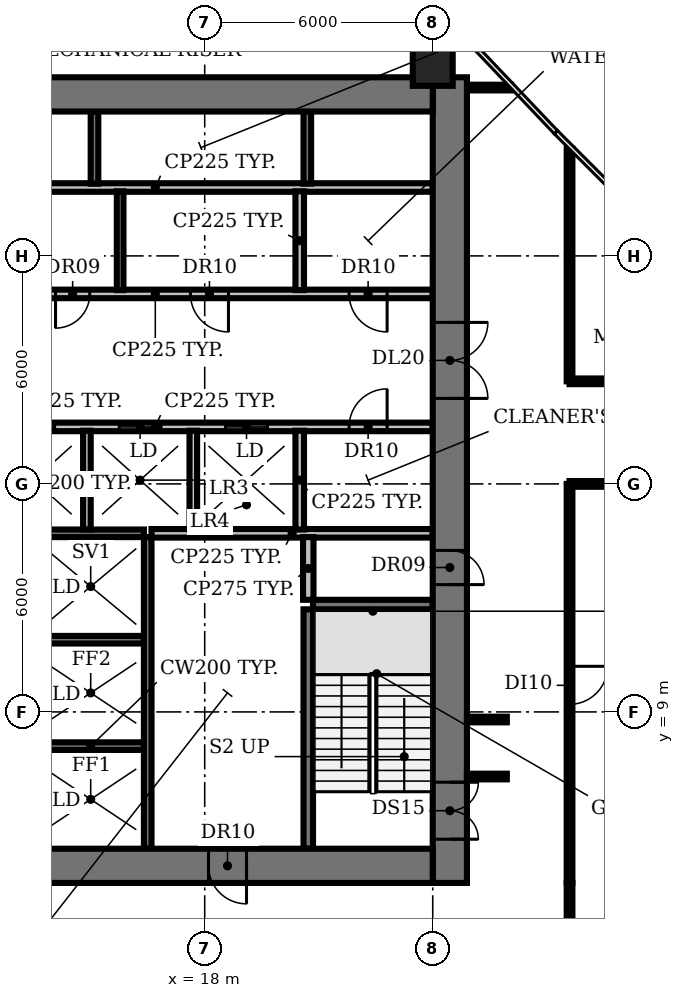
"""IFC4 building model, lengths in metres.
Left out: names, types, materials, properties, quantities, classifications, styles, units other than length and angle.
Written with IfcOpenShell. Run it as: python <this file> out.ifc"""

import sys

from ifc_helpers import new_model, si_unit, direction, frame, frame_2d, origin, origin_2d, place, context, subcontext, project, spatial, rectangle, circle, extrude, element, fill, save


model = new_model("IFC4")
c1 = context("Model", 3, precision=1e-05, world=origin(), true_north=direction((0.0, 1.0)))
c2 = subcontext(c1, "Body", "Model", "MODEL_VIEW")
j1 = project(units=[si_unit("LENGTHUNIT", "METRE"), si_unit("PLANEANGLEUNIT", "RADIAN")], contexts=[c1])
p1 = place(None, origin())
s1 = spatial("IfcSite", under=j1, at=p1, CompositionType="ELEMENT")
p2 = place(p1, origin())
s2 = spatial("IfcBuilding", under=s1, at=p2, CompositionType="ELEMENT")
p3 = place(p2, frame((0.0, 0.0, 45.8)))
s3 = spatial("IfcBuildingStorey", under=s2, at=p3, CompositionType="ELEMENT", Elevation=45.8)
p4 = place(p3, frame((24.0, 26.0, 0.0), z_axis=(0.0, 0.0, 1.0), x_axis=(1.0, 0.0, 0.0)))
e1 = element("IfcColumn", 1, at=p4, inside=s3, PredefinedType="COLUMN", context=c2, shape_type="SweptSolid", body=[
    extrude(circle(Radius=0.525, at=origin_2d()), origin(), (0.0, 0.0, 1.0), 3.85),
])
for number, where, z_axis, x_axis in (
    (2, (13.6, 8.1, 0.0), (0.0, 0.0, 1.0), (1.0, 0.0, 0.0)),
    (3, (13.6, 10.9, 0.0), (0.0, 0.0, 1.0), (1.0, 0.0, 0.0)),
):
    element("IfcWall", number, at=place(p3, frame(where, z_axis=z_axis, x_axis=x_axis)), inside=s3, PredefinedType="SHEAR", context=c2, shape_type="SweptSolid", body=[
        extrude(rectangle(XDim=2.8, YDim=0.2, at=frame_2d((1.4, 0.0))), origin(), (0.0, 0.0, 1.0), 3.85),
    ])
p5 = place(p3, frame((20.85, 11.825, 0.0), z_axis=(0.0, 0.0, 1.0), x_axis=(1.0, 0.0, 0.0)))
e4 = element("IfcWall", 4, at=p5, inside=s3, PredefinedType="SHEAR", context=c2, shape_type="SweptSolid", body=[
    extrude(rectangle(XDim=3.15, YDim=0.25, at=frame_2d((1.575, 0.0))), origin(), (0.0, 0.0, 1.0), 3.85),
])
p6 = place(p3, frame((13.6, 13.7, 0.0), z_axis=(0.0, 0.0, 1.0), x_axis=(1.0, 0.0, 0.0)))
e5 = element("IfcWall", 5, at=p6, inside=s3, PredefinedType="SHEAR", context=c2, shape_type="SweptSolid", body=[
    extrude(rectangle(XDim=2.8, YDim=0.2, at=frame_2d((1.4, 0.0))), origin(), (0.0, 0.0, 1.0), 3.85),
])
p7 = place(p3, frame((16.6, 13.7, 0.0), z_axis=(0.0, 0.0, 1.0), x_axis=(1.0, 0.0, 0.0)))
e6 = element("IfcWall", 6, at=p7, inside=s3, PredefinedType="PARTITIONING", context=c2, shape_type="SweptSolid", body=[
    extrude(rectangle(XDim=7.4, YDim=0.225, at=frame_2d((3.7, 0.0))), origin(), (0.0, 0.0, 1.0), 3.85),
])
p8 = place(p3, frame((9.4, 16.5, 0.0), z_axis=(0.0, 0.0, 1.0), x_axis=(1.0, 0.0, 0.0)))
e7 = element("IfcWall", 7, at=p8, inside=s3, PredefinedType="PARTITIONING", context=c2, shape_type="SweptSolid", body=[
    extrude(rectangle(XDim=14.6, YDim=0.225, at=frame_2d((7.3, 0.0))), origin(), (0.0, 0.0, 1.0), 3.85),
])
p9 = place(p8, frame((0.75, 0.0, 0.0)))
e8 = element("IfcOpeningElement", 8, at=p9, cuts=e7, PredefinedType="OPENING", context=c2, shape_type="SweptSolid", body=[
    extrude(rectangle(XDim=1.1, YDim=2.1, at=frame_2d((0.55, 1.05))), frame((0.0, 0.123, 0.0), z_axis=(0.0, -1.0, 0.0), x_axis=(1.0, 0.0, 0.0)), (0.0, 0.0, 1.0), 0.245),
])
p10 = place(p8, frame((3.55, 0.0, 0.0)))
e9 = element("IfcOpeningElement", 9, at=p10, cuts=e7, PredefinedType="OPENING", context=c2, shape_type="SweptSolid", body=[
    extrude(rectangle(XDim=1.1, YDim=2.1, at=frame_2d((0.55, 1.05))), frame((0.0, 0.123, 0.0), z_axis=(0.0, -1.0, 0.0), x_axis=(1.0, 0.0, 0.0)), (0.0, 0.0, 1.0), 0.245),
])
p11 = place(p8, frame((6.35, 0.0, 0.0)))
e10 = element("IfcOpeningElement", 10, at=p11, cuts=e7, PredefinedType="OPENING", context=c2, shape_type="SweptSolid", body=[
    extrude(rectangle(XDim=1.1, YDim=2.1, at=frame_2d((0.55, 1.05))), frame((0.0, 0.123, 0.0), z_axis=(0.0, -1.0, 0.0), x_axis=(1.0, 0.0, 0.0)), (0.0, 0.0, 1.0), 0.245),
])
p12 = place(p8, frame((9.15, 0.0, 0.0)))
e11 = element("IfcOpeningElement", 11, at=p12, cuts=e7, PredefinedType="OPENING", context=c2, shape_type="SweptSolid", body=[
    extrude(rectangle(XDim=1.1, YDim=2.1, at=frame_2d((0.55, 1.05))), frame((0.0, 0.123, 0.0), z_axis=(0.0, -1.0, 0.0), x_axis=(1.0, 0.0, 0.0)), (0.0, 0.0, 1.0), 0.245),
])
p13 = place(p8, frame((12.4, 0.0, 0.0)))
e12 = element("IfcOpeningElement", 12, at=p13, cuts=e7, PredefinedType="OPENING", context=c2, shape_type="SweptSolid", body=[
    extrude(rectangle(XDim=1.0, YDim=2.1, at=frame_2d((0.5, 1.05))), frame((0.0, 0.123, 0.0), z_axis=(0.0, -1.0, 0.0), x_axis=(1.0, 0.0, 0.0)), (0.0, 0.0, 1.0), 0.245),
])
p14 = place(p3, frame((24.0, 20.0, 0.0), z_axis=(0.0, 0.0, 1.0), x_axis=(-1.0, 0.0, 0.0)))
e13 = element("IfcWall", 13, at=p14, inside=s3, PredefinedType="PARTITIONING", context=c2, shape_type="SweptSolid", body=[
    extrude(rectangle(XDim=14.6, YDim=0.225, at=frame_2d((7.3, 0.0))), origin(), (0.0, 0.0, 1.0), 3.85),
])
p15 = place(p14, frame((12.2, 0.0, 0.0)))
e14 = element("IfcOpeningElement", 14, at=p15, cuts=e13, PredefinedType="OPENING", context=c2, shape_type="SweptSolid", body=[
    extrude(rectangle(XDim=1.0, YDim=2.1, at=frame_2d((0.5, 1.05))), frame((0.0, 0.123, 0.0), z_axis=(0.0, -1.0, 0.0), x_axis=(1.0, 0.0, 0.0)), (0.0, 0.0, 1.0), 0.245),
])
p16 = place(p14, frame((9.025, 0.0, 0.0)))
e15 = element("IfcOpeningElement", 15, at=p16, cuts=e13, PredefinedType="OPENING", context=c2, shape_type="SweptSolid", body=[
    extrude(rectangle(XDim=0.9, YDim=2.1, at=frame_2d((0.45, 1.05))), frame((0.0, 0.123, 0.0), z_axis=(0.0, -1.0, 0.0), x_axis=(1.0, 0.0, 0.0)), (0.0, 0.0, 1.0), 0.245),
])
p17 = place(p14, frame((5.375, 0.0, 0.0)))
e16 = element("IfcOpeningElement", 16, at=p17, cuts=e13, PredefinedType="OPENING", context=c2, shape_type="SweptSolid", body=[
    extrude(rectangle(XDim=1.0, YDim=2.1, at=frame_2d((0.5, 1.05))), frame((0.0, 0.123, 0.0), z_axis=(0.0, -1.0, 0.0), x_axis=(1.0, 0.0, 0.0)), (0.0, 0.0, 1.0), 0.245),
])
p18 = place(p14, frame((1.2, 0.0, 0.0)))
e17 = element("IfcOpeningElement", 17, at=p18, cuts=e13, PredefinedType="OPENING", context=c2, shape_type="SweptSolid", body=[
    extrude(rectangle(XDim=1.0, YDim=2.1, at=frame_2d((0.5, 1.05))), frame((0.0, 0.123, 0.0), z_axis=(0.0, -1.0, 0.0), x_axis=(1.0, 0.0, 0.0)), (0.0, 0.0, 1.0), 0.245),
])
p19 = place(p3, frame((9.4, 22.8, 0.0), z_axis=(0.0, 0.0, 1.0), x_axis=(1.0, 0.0, 0.0)))
e18 = element("IfcWall", 18, at=p19, inside=s3, PredefinedType="PARTITIONING", context=c2, shape_type="SweptSolid", body=[
    extrude(rectangle(XDim=14.6, YDim=0.225, at=frame_2d((7.3, 0.0))), origin(), (0.0, 0.0, 1.0), 3.85),
])
p20 = place(p3, frame((14.9, 13.8, 0.0), z_axis=(0.0, 0.0, 1.0), x_axis=(0.0, 1.0, 0.0)))
e19 = element("IfcWall", 19, at=p20, inside=s3, PredefinedType="SOLIDWALL", context=c2, shape_type="SweptSolid", body=[
    extrude(rectangle(XDim=2.6, YDim=0.2, at=frame_2d((1.3, 0.0))), origin(), (0.0, 0.0, 1.0), 3.85),
])
p21 = place(p3, frame((15.1, 22.9, 0.0), z_axis=(0.0, 0.0, 1.0), x_axis=(0.0, 1.0, 0.0)))
e20 = element("IfcWall", 20, at=p21, inside=s3, PredefinedType="SHEAR", context=c2, shape_type="SweptSolid", body=[
    extrude(rectangle(XDim=1.9, YDim=0.2, at=frame_2d((0.95, 0.0))), origin(), (0.0, 0.0, 1.0), 3.85),
])
p22 = place(p3, frame((15.775, 20.1, 0.0), z_axis=(0.0, 0.0, 1.0), x_axis=(0.0, 1.0, 0.0)))
e21 = element("IfcWall", 21, at=p22, inside=s3, PredefinedType="PARTITIONING", context=c2, shape_type="SweptSolid", body=[
    extrude(rectangle(XDim=2.6, YDim=0.175, at=frame_2d((1.3, 0.0))), origin(), (0.0, 0.0, 1.0), 3.85),
])
p23 = place(p3, frame((16.5, 5.4, 0.0), z_axis=(0.0, 0.0, 1.0), x_axis=(0.0, 1.0, 0.0)))
e22 = element("IfcWall", 22, at=p23, inside=s3, PredefinedType="SHEAR", context=c2, shape_type="SweptSolid", body=[
    extrude(rectangle(XDim=8.2, YDim=0.2, at=frame_2d((4.1, 0.0))), origin(), (0.0, 0.0, 1.0), 3.85),
])
p24 = place(p3, frame((17.7, 13.8, 0.0), z_axis=(0.0, 0.0, 1.0), x_axis=(0.0, 1.0, 0.0)))
e23 = element("IfcWall", 23, at=p24, inside=s3, PredefinedType="SOLIDWALL", context=c2, shape_type="SweptSolid", body=[
    extrude(rectangle(XDim=2.6, YDim=0.2, at=frame_2d((1.3, 0.0))), origin(), (0.0, 0.0, 1.0), 3.85),
])
for number, where, z_axis, x_axis in (
    (24, (20.5, 13.8, 0.0), (0.0, 0.0, 1.0), (0.0, 1.0, 0.0)),
    (25, (20.5, 20.1, 0.0), (0.0, 0.0, 1.0), (0.0, 1.0, 0.0)),
):
    element("IfcWall", number, at=place(p3, frame(where, z_axis=z_axis, x_axis=x_axis)), inside=s3, PredefinedType="PARTITIONING", context=c2, shape_type="SweptSolid", body=[
        extrude(rectangle(XDim=2.6, YDim=0.225, at=frame_2d((1.3, 0.0))), origin(), (0.0, 0.0, 1.0), 3.85),
    ])
p25 = place(p3, frame((20.7, 22.9, 0.0), z_axis=(0.0, 0.0, 1.0), x_axis=(0.0, 1.0, 0.0)))
e26 = element("IfcWall", 26, at=p25, inside=s3, PredefinedType="SHEAR", context=c2, shape_type="SweptSolid", body=[
    extrude(rectangle(XDim=1.9, YDim=0.2, at=frame_2d((0.95, 0.0))), origin(), (0.0, 0.0, 1.0), 3.85),
])
p26 = place(p3, frame((20.725, 5.4, 0.0), z_axis=(0.0, 0.0, 1.0), x_axis=(0.0, 1.0, 0.0)))
e27 = element("IfcWall", 27, at=p26, inside=s3, PredefinedType="SHEAR", context=c2, shape_type="SweptSolid", body=[
    extrude(rectangle(XDim=6.3, YDim=0.25, at=frame_2d((3.15, 0.0))), origin(), (0.0, 0.0, 1.0), 3.85),
])
p27 = place(p3, frame((20.725, 11.95, 0.0), z_axis=(0.0, 0.0, 1.0), x_axis=(0.0, 1.0, 0.0)))
e28 = element("IfcWall", 28, at=p27, inside=s3, PredefinedType="PARTITIONING", context=c2, shape_type="SweptSolid", body=[
    extrude(rectangle(XDim=1.65, YDim=0.275, at=frame_2d((0.825, 0.0))), origin(), (0.0, 0.0, 1.0), 3.85),
])
p28 = place(p3, frame((24.45, 25.7, 0.0), z_axis=(0.0, 0.0, 1.0), x_axis=(0.0, -1.0, 0.0)))
e29 = element("IfcWall", 29, at=p28, inside=s3, PredefinedType="SHEAR", context=c2, shape_type="SweptSolid", body=[
    extrude(rectangle(XDim=21.2, YDim=0.9, at=frame_2d((10.6, 0.0))), origin(), (0.0, 0.0, 1.0), 3.85),
])
p29 = place(p28, frame((18.55, 0.0, 0.0)))
e30 = element("IfcOpeningElement", 30, at=p29, cuts=e29, PredefinedType="OPENING", context=c2, shape_type="SweptSolid", body=[
    extrude(rectangle(XDim=1.5, YDim=2.1, at=frame_2d((0.75, 1.05))), frame((0.0, 0.46, 0.0), z_axis=(0.0, -1.0, 0.0), x_axis=(1.0, 0.0, 0.0)), (0.0, 0.0, 1.0), 0.92),
])
p30 = place(p28, frame((12.45, 0.0, 0.0)))
e31 = element("IfcOpeningElement", 31, at=p30, cuts=e29, PredefinedType="OPENING", context=c2, shape_type="SweptSolid", body=[
    extrude(rectangle(XDim=0.9, YDim=2.1, at=frame_2d((0.45, 1.05))), frame((0.0, 0.46, 0.0), z_axis=(0.0, -1.0, 0.0), x_axis=(1.0, 0.0, 0.0)), (0.0, 0.0, 1.0), 0.92),
])
p31 = place(p28, frame((6.45, 0.0, 0.0)))
e32 = element("IfcOpeningElement", 32, at=p31, cuts=e29, PredefinedType="OPENING", context=c2, shape_type="SweptSolid", body=[
    extrude(rectangle(XDim=2.0, YDim=2.1, at=frame_2d((1.0, 1.05))), frame((0.0, 0.46, 0.0), z_axis=(0.0, -1.0, 0.0), x_axis=(1.0, 0.0, 0.0)), (0.0, 0.0, 1.0), 0.92),
])
p32 = place(p3, frame((24.0, 4.95, 0.0), z_axis=(0.0, 0.0, 1.0), x_axis=(-1.0, 0.0, 0.0)))
e33 = element("IfcWall", 33, at=p32, inside=s3, PredefinedType="SHEAR", context=c2, shape_type="SweptSolid", body=[
    extrude(rectangle(XDim=18.0, YDim=0.9, at=frame_2d((9.0, 0.0))), origin(), (0.0, 0.0, 1.0), 3.85),
])
p33 = place(p32, frame((13.0, 0.0, 0.0)))
e34 = element("IfcOpeningElement", 34, at=p33, cuts=e33, PredefinedType="OPENING", context=c2, shape_type="SweptSolid", body=[
    extrude(rectangle(XDim=1.2, YDim=2.1, at=frame_2d((0.6, 1.05))), frame((0.0, 0.46, 0.0), z_axis=(0.0, -1.0, 0.0), x_axis=(1.0, 0.0, 0.0)), (0.0, 0.0, 1.0), 0.92),
])
p34 = place(p32, frame((4.9, 0.0, 0.0)))
e35 = element("IfcOpeningElement", 35, at=p34, cuts=e33, PredefinedType="OPENING", context=c2, shape_type="SweptSolid", body=[
    extrude(rectangle(XDim=1.0, YDim=2.1, at=frame_2d((0.5, 1.05))), frame((0.0, 0.46, 0.0), z_axis=(0.0, -1.0, 0.0), x_axis=(1.0, 0.0, 0.0)), (0.0, 0.0, 1.0), 0.92),
])
p35 = place(p3, frame((6.0, 25.25, 0.0), z_axis=(0.0, 0.0, 1.0), x_axis=(1.0, 0.0, 0.0)))
e36 = element("IfcWall", 36, at=p35, inside=s3, PredefinedType="SHEAR", context=c2, shape_type="SweptSolid", body=[
    extrude(rectangle(XDim=18.0, YDim=0.9, at=frame_2d((9.0, 0.0))), origin(), (0.0, 0.0, 1.0), 3.85),
])
for number, where, z_axis, x_axis in (
    (37, (24.9, 7.3, 0.0), (0.0, 0.0, 1.0), (1.0, 0.0, 0.0)),
    (38, (24.9, 8.8, 0.0), (0.0, 0.0, 1.0), (1.0, 0.0, 0.0)),
):
    element("IfcWall", number, at=place(p3, frame(where, z_axis=z_axis, x_axis=x_axis)), inside=s3, PredefinedType="PARTITIONING", context=c2, shape_type="SweptSolid", body=[
        extrude(rectangle(XDim=1.05, YDim=0.15, at=frame_2d((0.525, 0.0))), origin(), (0.0, 0.0, 1.0), 2.83),
    ])
p36 = place(p3, frame((25.0, 25.43, 0.0), z_axis=(0.0, 0.0, 1.0), x_axis=(1.0, 0.0, 0.0)))
e39 = element("IfcWall", 39, at=p36, inside=s3, PredefinedType="PARTITIONING", context=c2, shape_type="SweptSolid", body=[
    extrude(rectangle(XDim=1.06, YDim=0.15, at=frame_2d((0.53, 0.0))), origin(), (0.0, 0.0, 1.0), 2.83),
])
p37 = place(p3, frame((27.6, 0.6, 0.0), z_axis=(0.0, 0.0, 1.0), x_axis=(0.0, 1.0, 0.0)))
e40 = element("IfcWall", 40, at=p37, inside=s3, PredefinedType="PARTITIONING", context=c2, shape_type="SweptSolid", body=[
    extrude(rectangle(XDim=3.9, YDim=0.15, at=frame_2d((1.95, 0.0))), origin(), (0.0, 0.0, 1.0), 2.83),
])
p38 = place(p3, frame((27.6, 15.0, 0.0), z_axis=(0.0, 0.0, 1.0), x_axis=(0.0, -1.0, 0.0)))
e41 = element("IfcWall", 41, at=p38, inside=s3, PredefinedType="PARTITIONING", context=c2, shape_type="SweptSolid", body=[
    extrude(rectangle(XDim=10.5, YDim=0.15, at=frame_2d((5.25, 0.0))), origin(), (0.0, 0.0, 1.0), 2.83),
])
p39 = place(p38, frame((4.8, 0.0, 0.0)))
e42 = element("IfcOpeningElement", 42, at=p39, cuts=e41, PredefinedType="OPENING", context=c2, shape_type="SweptSolid", body=[
    extrude(rectangle(XDim=1.0, YDim=2.1, at=frame_2d((0.5, 1.05))), frame((0.0, 0.085, 0.0), z_axis=(0.0, -1.0, 0.0), x_axis=(1.0, 0.0, 0.0)), (0.0, 0.0, 1.0), 0.17),
])
p40 = place(p3, frame((27.6, 15.0, 0.0), z_axis=(0.0, 0.0, 1.0), x_axis=(1.0, 0.0, 0.0)))
e43 = element("IfcWall", 43, at=p40, inside=s3, PredefinedType="PARTITIONING", context=c2, shape_type="SweptSolid", body=[
    extrude(rectangle(XDim=8.4, YDim=0.15, at=frame_2d((4.2, 0.0))), origin(), (0.0, 0.0, 1.0), 2.83),
])
p41 = place(p3, frame((27.6, 17.7, 0.0), z_axis=(0.0, 0.0, 1.0), x_axis=(0.0, 1.0, 0.0)))
e44 = element("IfcWall", 44, at=p41, inside=s3, PredefinedType="PARTITIONING", context=c2, shape_type="SweptSolid", body=[
    extrude(rectangle(XDim=6.12, YDim=0.15, at=frame_2d((3.06, 0.0))), origin(), (0.0, 0.0, 1.0), 2.83),
])
p42 = place(p3, frame((27.6, 17.7, 0.0), z_axis=(0.0, 0.0, 1.0), x_axis=(1.0, 0.0, 0.0)))
e45 = element("IfcWall", 45, at=p42, inside=s3, PredefinedType="PARTITIONING", context=c2, shape_type="SweptSolid", body=[
    extrude(rectangle(XDim=8.4, YDim=0.15, at=frame_2d((4.2, 0.0))), origin(), (0.0, 0.0, 1.0), 2.83),
])
p43 = place(p42, frame((3.9, 0.0, 0.0)))
e46 = element("IfcOpeningElement", 46, at=p43, cuts=e45, PredefinedType="OPENING", context=c2, shape_type="SweptSolid", body=[
    extrude(rectangle(XDim=1.0, YDim=2.1, at=frame_2d((0.5, 1.05))), frame((0.0, 0.085, 0.0), z_axis=(0.0, -1.0, 0.0), x_axis=(1.0, 0.0, 0.0)), (0.0, 0.0, 1.0), 0.17),
])
p44 = place(p10, origin())
e47 = element("IfcDoor", 47, at=p44, inside=s3, OperationType="DOUBLE_DOOR_SLIDING", PredefinedType="DOOR", context=c2, shape_type="SweptSolid", body=[
    extrude(rectangle(XDim=1.1, YDim=2.1, at=frame_2d((0.55, 1.05))), frame((0.0, 0.025, 0.0), z_axis=(0.0, -1.0, 0.0), x_axis=(1.0, 0.0, 0.0)), (0.0, 0.0, 1.0), 0.05),
])
fill(e9, e47)
p45 = place(p11, origin())
e48 = element("IfcDoor", 48, at=p45, inside=s3, OperationType="DOUBLE_DOOR_SLIDING", PredefinedType="DOOR", context=c2, shape_type="SweptSolid", body=[
    extrude(rectangle(XDim=1.1, YDim=2.1, at=frame_2d((0.55, 1.05))), frame((0.0, 0.025, 0.0), z_axis=(0.0, -1.0, 0.0), x_axis=(1.0, 0.0, 0.0)), (0.0, 0.0, 1.0), 0.05),
])
fill(e10, e48)
p46 = place(p12, origin())
e49 = element("IfcDoor", 49, at=p46, inside=s3, OperationType="DOUBLE_DOOR_SLIDING", PredefinedType="DOOR", context=c2, shape_type="SweptSolid", body=[
    extrude(rectangle(XDim=1.1, YDim=2.1, at=frame_2d((0.55, 1.05))), frame((0.0, 0.025, 0.0), z_axis=(0.0, -1.0, 0.0), x_axis=(1.0, 0.0, 0.0)), (0.0, 0.0, 1.0), 0.05),
])
fill(e11, e49)
p47 = place(p13, origin())
e50 = element("IfcDoor", 50, at=p47, inside=s3, OperationType="SINGLE_SWING_RIGHT", PredefinedType="DOOR", context=c2, shape_type="SweptSolid", body=[
    extrude(rectangle(XDim=1.0, YDim=2.1, at=frame_2d((0.5, 1.05))), frame((0.0, 0.025, 0.0), z_axis=(0.0, -1.0, 0.0), x_axis=(1.0, 0.0, 0.0)), (0.0, 0.0, 1.0), 0.05),
])
fill(e12, e50)
p48 = place(p16, origin())
e51 = element("IfcDoor", 51, at=p48, inside=s3, OperationType="SINGLE_SWING_RIGHT", PredefinedType="DOOR", context=c2, shape_type="SweptSolid", body=[
    extrude(rectangle(XDim=0.9, YDim=2.1, at=frame_2d((0.45, 1.05))), frame((0.0, 0.025, 0.0), z_axis=(0.0, -1.0, 0.0), x_axis=(1.0, 0.0, 0.0)), (0.0, 0.0, 1.0), 0.05),
])
fill(e15, e51)
p49 = place(p17, origin())
e52 = element("IfcDoor", 52, at=p49, inside=s3, OperationType="SINGLE_SWING_LEFT", PredefinedType="DOOR", context=c2, shape_type="SweptSolid", body=[
    extrude(rectangle(XDim=1.0, YDim=2.1, at=frame_2d((0.5, 1.05))), frame((0.0, 0.025, 0.0), z_axis=(0.0, -1.0, 0.0), x_axis=(1.0, 0.0, 0.0)), (0.0, 0.0, 1.0), 0.05),
])
fill(e16, e52)
p50 = place(p18, origin())
e53 = element("IfcDoor", 53, at=p50, inside=s3, OperationType="SINGLE_SWING_LEFT", PredefinedType="DOOR", context=c2, shape_type="SweptSolid", body=[
    extrude(rectangle(XDim=1.0, YDim=2.1, at=frame_2d((0.5, 1.05))), frame((0.0, 0.025, 0.0), z_axis=(0.0, -1.0, 0.0), x_axis=(1.0, 0.0, 0.0)), (0.0, 0.0, 1.0), 0.05),
])
fill(e17, e53)
p51 = place(p29, origin())
e54 = element("IfcDoor", 54, at=p51, inside=s3, OperationType="DOUBLE_DOOR_SINGLE_SWING", PredefinedType="DOOR", context=c2, shape_type="SweptSolid", body=[
    extrude(rectangle(XDim=1.5, YDim=2.1, at=frame_2d((0.75, 1.05))), frame((0.0, 0.025, 0.0), z_axis=(0.0, -1.0, 0.0), x_axis=(1.0, 0.0, 0.0)), (0.0, 0.0, 1.0), 0.05),
])
fill(e30, e54)
p52 = place(p30, origin())
e55 = element("IfcDoor", 55, at=p52, inside=s3, OperationType="SINGLE_SWING_RIGHT", PredefinedType="DOOR", context=c2, shape_type="SweptSolid", body=[
    extrude(rectangle(XDim=0.9, YDim=2.1, at=frame_2d((0.45, 1.05))), frame((0.0, -0.39, 0.0), z_axis=(0.0, -1.0, 0.0), x_axis=(1.0, 0.0, 0.0)), (0.0, 0.0, 1.0), 0.05),
])
fill(e31, e55)
p53 = place(p31, origin())
e56 = element("IfcDoor", 56, at=p53, inside=s3, OperationType="DOUBLE_DOOR_SINGLE_SWING", PredefinedType="DOOR", context=c2, shape_type="SweptSolid", body=[
    extrude(rectangle(XDim=2.0, YDim=2.1, at=frame_2d((1.0, 1.05))), frame((0.0, 0.025, 0.0), z_axis=(0.0, -1.0, 0.0), x_axis=(1.0, 0.0, 0.0)), (0.0, 0.0, 1.0), 0.05),
])
fill(e32, e56)
p54 = place(p34, origin())
e57 = element("IfcDoor", 57, at=p54, inside=s3, OperationType="SINGLE_SWING_LEFT", PredefinedType="DOOR", context=c2, shape_type="SweptSolid", body=[
    extrude(rectangle(XDim=1.0, YDim=2.1, at=frame_2d((0.5, 1.05))), frame((0.0, -0.39, 0.0), z_axis=(0.0, -1.0, 0.0), x_axis=(1.0, 0.0, 0.0)), (0.0, 0.0, 1.0), 0.05),
])
fill(e35, e57)
p55 = place(p39, origin())
e58 = element("IfcDoor", 58, at=p55, inside=s3, OperationType="SINGLE_SWING_LEFT", PredefinedType="DOOR", context=c2, shape_type="SweptSolid", body=[
    extrude(rectangle(XDim=1.0, YDim=2.1, at=frame_2d((0.5, 1.05))), frame((0.0, 0.025, 0.0), z_axis=(0.0, -1.0, 0.0), x_axis=(1.0, 0.0, 0.0)), (0.0, 0.0, 1.0), 0.05),
])
fill(e42, e58)
save(model, sys.argv[1])
